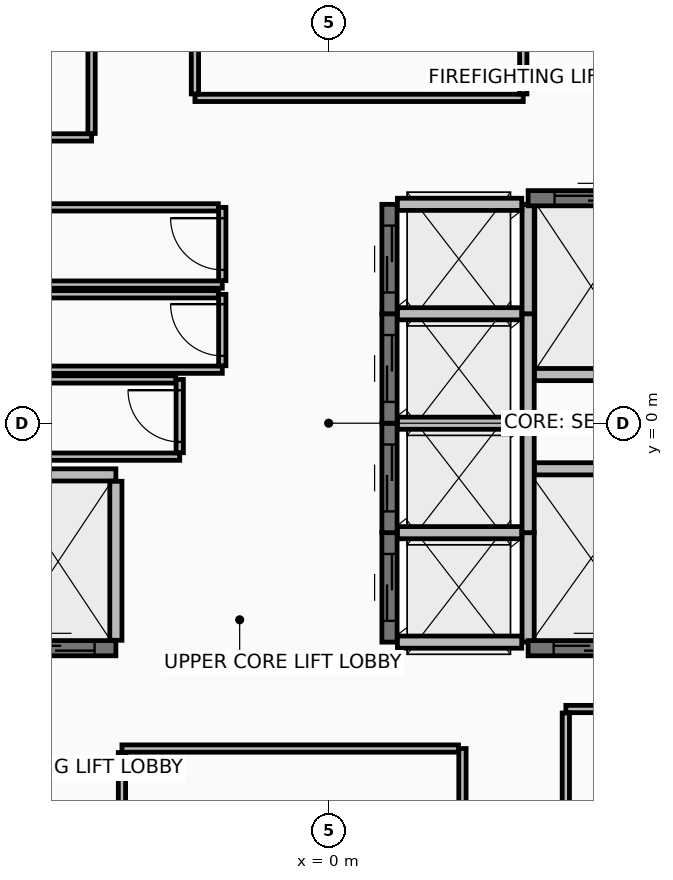
"""IFC4 building model, lengths in metres.
Left out: names, types, materials, properties, quantities, classifications, styles, units other than length and angle.
Written with IfcOpenShell. Run it as: python <this file> out.ifc"""

import sys

from ifc_helpers import new_model, si_unit, direction, frame, frame_2d, origin, place, context, subcontext, project, spatial, rectangle, extrude, element, fill, save


model = new_model("IFC4")
c1 = context("Model", 3, precision=1e-05, world=origin(), true_north=direction((0.0, 1.0)))
c2 = subcontext(c1, "Body", "Model", "MODEL_VIEW")
j1 = project(units=[si_unit("LENGTHUNIT", "METRE"), si_unit("PLANEANGLEUNIT", "RADIAN")], contexts=[c1])
p1 = place(None, origin())
s1 = spatial("IfcSite", under=j1, at=p1, CompositionType="ELEMENT")
p2 = place(p1, origin())
s2 = spatial("IfcBuilding", under=s1, at=p2, CompositionType="ELEMENT")
p3 = place(p2, frame((0.0, 0.0, 298.0)))
s3 = spatial("IfcBuildingStorey", under=s2, at=p3, CompositionType="ELEMENT", Elevation=298.0)
p4 = place(p3, frame((1.0, -3.6, 0.0), z_axis=(0.0, 0.0, 1.0), x_axis=(0.0, 1.0, 0.0)))
e1 = element("IfcWall", 1, at=p4, inside=s3, PredefinedType="SHEAR", context=c2, shape_type="SweptSolid", body=[
    extrude(rectangle(XDim=1.8, YDim=0.25, at=frame_2d((0.9, 0.0))), origin(), (0.0, 0.0, 1.0), 3.95),
])
p5 = place(p4, frame((0.35, 0.0, 0.0)))
e2 = element("IfcOpeningElement", 2, at=p5, cuts=e1, PredefinedType="OPENING", context=c2, shape_type="SweptSolid", body=[
    extrude(rectangle(XDim=1.1, YDim=2.2, at=frame_2d((0.55, 1.1))), frame((0.0, 0.135, 0.0), z_axis=(0.0, -1.0, 0.0), x_axis=(1.0, 0.0, 0.0)), (0.0, 0.0, 1.0), 0.27),
])
p6 = place(p3, frame((3.28, -3.6, 0.0), z_axis=(0.0, 0.0, 1.0), x_axis=(0.0, 1.0, 0.0)))
e3 = element("IfcWall", 3, at=p6, inside=s3, PredefinedType="PARTITIONING", context=c2, shape_type="SweptSolid", body=[
    extrude(rectangle(XDim=1.8, YDim=0.2, at=frame_2d((0.9, 0.0))), origin(), (0.0, 0.0, 1.0), 3.95),
])
for number, where, z_axis, x_axis in (
    (4, (1.13, -3.6, 0.0), (0.0, 0.0, 1.0), (1.0, 0.0, 0.0)),
    (5, (1.13, -1.8, 0.0), (0.0, 0.0, 1.0), (1.0, 0.0, 0.0)),
):
    element("IfcWall", number, at=place(p3, frame(where, z_axis=z_axis, x_axis=x_axis)), inside=s3, PredefinedType="PARTITIONING", context=c2, shape_type="SweptSolid", body=[
        extrude(rectangle(XDim=2.045, YDim=0.2, at=frame_2d((1.022, 0.0))), origin(), (0.0, 0.0, 1.0), 3.95),
    ])
p7 = place(p3, frame((1.0, -1.8, 0.0), z_axis=(0.0, 0.0, 1.0), x_axis=(0.0, 1.0, 0.0)))
e6 = element("IfcWall", 6, at=p7, inside=s3, PredefinedType="SHEAR", context=c2, shape_type="SweptSolid", body=[
    extrude(rectangle(XDim=1.8, YDim=0.25, at=frame_2d((0.9, 0.0))), origin(), (0.0, 0.0, 1.0), 3.95),
])
p8 = place(p7, frame((0.35, 0.0, 0.0)))
e7 = element("IfcOpeningElement", 7, at=p8, cuts=e6, PredefinedType="OPENING", context=c2, shape_type="SweptSolid", body=[
    extrude(rectangle(XDim=1.1, YDim=2.2, at=frame_2d((0.55, 1.1))), frame((0.0, 0.135, 0.0), z_axis=(0.0, -1.0, 0.0), x_axis=(1.0, 0.0, 0.0)), (0.0, 0.0, 1.0), 0.27),
])
p9 = place(p3, frame((3.28, -1.8, 0.0), z_axis=(0.0, 0.0, 1.0), x_axis=(0.0, 1.0, 0.0)))
e8 = element("IfcWall", 8, at=p9, inside=s3, PredefinedType="PARTITIONING", context=c2, shape_type="SweptSolid", body=[
    extrude(rectangle(XDim=1.8, YDim=0.2, at=frame_2d((0.9, 0.0))), origin(), (0.0, 0.0, 1.0), 3.95),
])
p10 = place(p3, frame((1.13, 0.0, 0.0), z_axis=(0.0, 0.0, 1.0), x_axis=(1.0, 0.0, 0.0)))
e9 = element("IfcWall", 9, at=p10, inside=s3, PredefinedType="PARTITIONING", context=c2, shape_type="SweptSolid", body=[
    extrude(rectangle(XDim=2.045, YDim=0.2, at=frame_2d((1.022, 0.0))), origin(), (0.0, 0.0, 1.0), 3.95),
])
p11 = place(p3, frame((1.0, 0.0, 0.0), z_axis=(0.0, 0.0, 1.0), x_axis=(0.0, 1.0, 0.0)))
e10 = element("IfcWall", 10, at=p11, inside=s3, PredefinedType="SHEAR", context=c2, shape_type="SweptSolid", body=[
    extrude(rectangle(XDim=1.8, YDim=0.25, at=frame_2d((0.9, 0.0))), origin(), (0.0, 0.0, 1.0), 3.95),
])
p12 = place(p11, frame((0.35, 0.0, 0.0)))
e11 = element("IfcOpeningElement", 11, at=p12, cuts=e10, PredefinedType="OPENING", context=c2, shape_type="SweptSolid", body=[
    extrude(rectangle(XDim=1.1, YDim=2.2, at=frame_2d((0.55, 1.1))), frame((0.0, 0.135, 0.0), z_axis=(0.0, -1.0, 0.0), x_axis=(1.0, 0.0, 0.0)), (0.0, 0.0, 1.0), 0.27),
])
p13 = place(p3, frame((3.28, 0.0, 0.0), z_axis=(0.0, 0.0, 1.0), x_axis=(0.0, 1.0, 0.0)))
e12 = element("IfcWall", 12, at=p13, inside=s3, PredefinedType="PARTITIONING", context=c2, shape_type="SweptSolid", body=[
    extrude(rectangle(XDim=1.8, YDim=0.2, at=frame_2d((0.9, 0.0))), origin(), (0.0, 0.0, 1.0), 3.95),
])
p14 = place(p3, frame((1.13, 1.8, 0.0), z_axis=(0.0, 0.0, 1.0), x_axis=(1.0, 0.0, 0.0)))
e13 = element("IfcWall", 13, at=p14, inside=s3, PredefinedType="PARTITIONING", context=c2, shape_type="SweptSolid", body=[
    extrude(rectangle(XDim=2.045, YDim=0.2, at=frame_2d((1.022, 0.0))), origin(), (0.0, 0.0, 1.0), 3.95),
])
p15 = place(p3, frame((1.0, 1.8, 0.0), z_axis=(0.0, 0.0, 1.0), x_axis=(0.0, 1.0, 0.0)))
e14 = element("IfcWall", 14, at=p15, inside=s3, PredefinedType="SHEAR", context=c2, shape_type="SweptSolid", body=[
    extrude(rectangle(XDim=1.8, YDim=0.25, at=frame_2d((0.9, 0.0))), origin(), (0.0, 0.0, 1.0), 3.95),
])
p16 = place(p15, frame((0.35, 0.0, 0.0)))
e15 = element("IfcOpeningElement", 15, at=p16, cuts=e14, PredefinedType="OPENING", context=c2, shape_type="SweptSolid", body=[
    extrude(rectangle(XDim=1.1, YDim=2.2, at=frame_2d((0.55, 1.1))), frame((0.0, 0.135, 0.0), z_axis=(0.0, -1.0, 0.0), x_axis=(1.0, 0.0, 0.0)), (0.0, 0.0, 1.0), 0.27),
])
p17 = place(p3, frame((3.28, 1.8, 0.0), z_axis=(0.0, 0.0, 1.0), x_axis=(0.0, 1.0, 0.0)))
e16 = element("IfcWall", 16, at=p17, inside=s3, PredefinedType="PARTITIONING", context=c2, shape_type="SweptSolid", body=[
    extrude(rectangle(XDim=1.8, YDim=0.2, at=frame_2d((0.9, 0.0))), origin(), (0.0, 0.0, 1.0), 3.95),
])
p18 = place(p3, frame((1.13, 3.6, 0.0), z_axis=(0.0, 0.0, 1.0), x_axis=(1.0, 0.0, 0.0)))
e17 = element("IfcWall", 17, at=p18, inside=s3, PredefinedType="PARTITIONING", context=c2, shape_type="SweptSolid", body=[
    extrude(rectangle(XDim=2.045, YDim=0.2, at=frame_2d((1.022, 0.0))), origin(), (0.0, 0.0, 1.0), 3.245),
])
p19 = place(p3, frame((-5.4, -3.7, 0.0), z_axis=(0.0, 0.0, 1.0), x_axis=(1.0, 0.0, 0.0)))
e18 = element("IfcWall", 18, at=p19, inside=s3, PredefinedType="SHEAR", context=c2, shape_type="SweptSolid", body=[
    extrude(rectangle(XDim=1.9, YDim=0.25, at=frame_2d((0.95, 0.0))), origin(), (0.0, 0.0, 1.0), 3.95),
])
p20 = place(p19, frame((0.35, 0.0, 0.0)))
e19 = element("IfcOpeningElement", 19, at=p20, cuts=e18, PredefinedType="OPENING", context=c2, shape_type="SweptSolid", body=[
    extrude(rectangle(XDim=1.2, YDim=2.2, at=frame_2d((0.6, 1.1))), frame((0.0, 0.135, 0.0), z_axis=(0.0, -1.0, 0.0), x_axis=(1.0, 0.0, 0.0)), (0.0, 0.0, 1.0), 0.27),
])
p21 = place(p3, frame((-5.27, -0.85, 0.0), z_axis=(0.0, 0.0, 1.0), x_axis=(1.0, 0.0, 0.0)))
e20 = element("IfcWall", 20, at=p21, inside=s3, PredefinedType="PARTITIONING", context=c2, shape_type="SweptSolid", body=[
    extrude(rectangle(XDim=1.77, YDim=0.2, at=frame_2d((0.885, 0.0))), origin(), (0.0, 0.0, 1.0), 3.95),
])
p22 = place(p3, frame((-3.5, -3.57, 0.0), z_axis=(0.0, 0.0, 1.0), x_axis=(0.0, 1.0, 0.0)))
e21 = element("IfcWall", 21, at=p22, inside=s3, PredefinedType="PARTITIONING", context=c2, shape_type="SweptSolid", body=[
    extrude(rectangle(XDim=2.615, YDim=0.2, at=frame_2d((1.308, 0.0))), origin(), (0.0, 0.0, 1.0), 3.95),
])
p23 = place(p3, frame((3.28, 3.7, 0.0), z_axis=(0.0, 0.0, 1.0), x_axis=(1.0, 0.0, 0.0)))
e22 = element("IfcWall", 22, at=p23, inside=s3, PredefinedType="SHEAR", context=c2, shape_type="SweptSolid", body=[
    extrude(rectangle(XDim=2.07, YDim=0.25, at=frame_2d((1.035, 0.0))), origin(), (0.0, 0.0, 1.0), 3.95),
])
p24 = place(p23, frame((0.435, 0.0, 0.0)))
e23 = element("IfcOpeningElement", 23, at=p24, cuts=e22, PredefinedType="OPENING", context=c2, shape_type="SweptSolid", body=[
    extrude(rectangle(XDim=1.2, YDim=2.2, at=frame_2d((0.6, 1.1))), frame((0.0, 0.135, 0.0), z_axis=(0.0, -1.0, 0.0), x_axis=(1.0, 0.0, 0.0)), (0.0, 0.0, 1.0), 0.27),
])
p25 = place(p3, frame((3.385, 0.8, 0.0), z_axis=(0.0, 0.0, 1.0), x_axis=(1.0, 0.0, 0.0)))
e24 = element("IfcWall", 24, at=p25, inside=s3, PredefinedType="PARTITIONING", context=c2, shape_type="SweptSolid", body=[
    extrude(rectangle(XDim=1.835, YDim=0.2, at=frame_2d((0.917, 0.0))), origin(), (0.0, 0.0, 1.0), 3.95),
])
p26 = place(p3, frame((3.28, -3.7, 0.0), z_axis=(0.0, 0.0, 1.0), x_axis=(1.0, 0.0, 0.0)))
e25 = element("IfcWall", 25, at=p26, inside=s3, PredefinedType="SHEAR", context=c2, shape_type="SweptSolid", body=[
    extrude(rectangle(XDim=1.94, YDim=0.25, at=frame_2d((0.97, 0.0))), origin(), (0.0, 0.0, 1.0), 3.95),
])
p27 = place(p26, frame((0.42, 0.0, 0.0)))
e26 = element("IfcOpeningElement", 26, at=p27, cuts=e25, PredefinedType="OPENING", context=c2, shape_type="SweptSolid", body=[
    extrude(rectangle(XDim=1.1, YDim=2.2, at=frame_2d((0.55, 1.1))), frame((0.0, 0.135, 0.0), z_axis=(0.0, -1.0, 0.0), x_axis=(1.0, 0.0, 0.0)), (0.0, 0.0, 1.0), 0.27),
])
p28 = place(p3, frame((3.385, -0.75, 0.0), z_axis=(0.0, 0.0, 1.0), x_axis=(1.0, 0.0, 0.0)))
e27 = element("IfcWall", 27, at=p28, inside=s3, PredefinedType="PARTITIONING", context=c2, shape_type="SweptSolid", body=[
    extrude(rectangle(XDim=1.835, YDim=0.2, at=frame_2d((0.917, 0.0))), origin(), (0.0, 0.0, 1.0), 3.95),
])
p29 = place(p3, frame((-5.22, 2.28, 0.0), z_axis=(0.0, 0.0, 1.0), x_axis=(1.0, 0.0, 0.0)))
e28 = element("IfcWall", 28, at=p29, inside=s3, PredefinedType="PARTITIONING", context=c2, shape_type="SweptSolid", body=[
    extrude(rectangle(XDim=3.47, YDim=0.12, at=frame_2d((1.735, 0.0))), origin(), (0.0, 0.0, 1.0), 3.95),
])
p30 = place(p3, frame((-1.75, 2.345, 0.0), z_axis=(0.0, 0.0, 1.0), x_axis=(0.0, 1.0, 0.0)))
e29 = element("IfcWall", 29, at=p30, inside=s3, PredefinedType="PARTITIONING", context=c2, shape_type="SweptSolid", body=[
    extrude(rectangle(XDim=1.205, YDim=0.12, at=frame_2d((0.603, 0.0))), origin(), (0.0, 0.0, 1.0), 3.95),
])
p31 = place(p30, frame((0.177, 0.0, 0.0)))
e30 = element("IfcOpeningElement", 30, at=p31, cuts=e29, PredefinedType="OPENING", context=c2, shape_type="SweptSolid", body=[
    extrude(rectangle(XDim=0.85, YDim=2.1, at=frame_2d((0.425, 1.05))), frame((0.0, 0.07, 0.0), z_axis=(0.0, -1.0, 0.0), x_axis=(1.0, 0.0, 0.0)), (0.0, 0.0, 1.0), 0.14),
])
p32 = place(p3, frame((-1.815, 3.55, 0.0), z_axis=(0.0, 0.0, 1.0), x_axis=(-1.0, 0.0, 0.0)))
e31 = element("IfcWall", 31, at=p32, inside=s3, PredefinedType="PARTITIONING", context=c2, shape_type="SweptSolid", body=[
    extrude(rectangle(XDim=3.405, YDim=0.12, at=frame_2d((1.703, 0.0))), origin(), (0.0, 0.0, 1.0), 3.95),
])
p33 = place(p3, frame((-5.22, 0.88, 0.0), z_axis=(0.0, 0.0, 1.0), x_axis=(1.0, 0.0, 0.0)))
e32 = element("IfcWall", 32, at=p33, inside=s3, PredefinedType="PARTITIONING", context=c2, shape_type="SweptSolid", body=[
    extrude(rectangle(XDim=3.47, YDim=0.12, at=frame_2d((1.735, 0.0))), origin(), (0.0, 0.0, 1.0), 3.95),
])
p34 = place(p3, frame((-1.75, 0.945, 0.0), z_axis=(0.0, 0.0, 1.0), x_axis=(0.0, 1.0, 0.0)))
e33 = element("IfcWall", 33, at=p34, inside=s3, PredefinedType="PARTITIONING", context=c2, shape_type="SweptSolid", body=[
    extrude(rectangle(XDim=1.175, YDim=0.12, at=frame_2d((0.587, 0.0))), origin(), (0.0, 0.0, 1.0), 3.95),
])
p35 = place(p34, frame((0.163, 0.0, 0.0)))
e34 = element("IfcOpeningElement", 34, at=p35, cuts=e33, PredefinedType="OPENING", context=c2, shape_type="SweptSolid", body=[
    extrude(rectangle(XDim=0.85, YDim=2.1, at=frame_2d((0.425, 1.05))), frame((0.0, 0.07, 0.0), z_axis=(0.0, -1.0, 0.0), x_axis=(1.0, 0.0, 0.0)), (0.0, 0.0, 1.0), 0.14),
])
p36 = place(p3, frame((-1.815, 2.12, 0.0), z_axis=(0.0, 0.0, 1.0), x_axis=(-1.0, 0.0, 0.0)))
e35 = element("IfcWall", 35, at=p36, inside=s3, PredefinedType="PARTITIONING", context=c2, shape_type="SweptSolid", body=[
    extrude(rectangle(XDim=3.405, YDim=0.12, at=frame_2d((1.703, 0.0))), origin(), (0.0, 0.0, 1.0), 3.95),
])
p37 = place(p3, frame((-5.22, -0.55, 0.0), z_axis=(0.0, 0.0, 1.0), x_axis=(1.0, 0.0, 0.0)))
e36 = element("IfcWall", 36, at=p37, inside=s3, PredefinedType="PARTITIONING", context=c2, shape_type="SweptSolid", body=[
    extrude(rectangle(XDim=2.77, YDim=0.12, at=frame_2d((1.385, 0.0))), origin(), (0.0, 0.0, 1.0), 3.95),
])
p38 = place(p3, frame((-2.45, -0.485, 0.0), z_axis=(0.0, 0.0, 1.0), x_axis=(0.0, 1.0, 0.0)))
e37 = element("IfcWall", 37, at=p38, inside=s3, PredefinedType="PARTITIONING", context=c2, shape_type="SweptSolid", body=[
    extrude(rectangle(XDim=1.205, YDim=0.12, at=frame_2d((0.603, 0.0))), origin(), (0.0, 0.0, 1.0), 3.95),
])
p39 = place(p38, frame((0.178, 0.0, 0.0)))
e38 = element("IfcOpeningElement", 38, at=p39, cuts=e37, PredefinedType="OPENING", context=c2, shape_type="SweptSolid", body=[
    extrude(rectangle(XDim=0.85, YDim=2.1, at=frame_2d((0.425, 1.05))), frame((0.0, 0.07, 0.0), z_axis=(0.0, -1.0, 0.0), x_axis=(1.0, 0.0, 0.0)), (0.0, 0.0, 1.0), 0.14),
])
p40 = place(p3, frame((-2.515, 0.72, 0.0), z_axis=(0.0, 0.0, 1.0), x_axis=(-1.0, 0.0, 0.0)))
e39 = element("IfcWall", 39, at=p40, inside=s3, PredefinedType="PARTITIONING", context=c2, shape_type="SweptSolid", body=[
    extrude(rectangle(XDim=2.705, YDim=0.12, at=frame_2d((1.353, 0.0))), origin(), (0.0, 0.0, 1.0), 3.95),
])
p41 = place(p3, frame((2.2, -7.42, 0.0), z_axis=(0.0, 0.0, 1.0), x_axis=(0.0, 1.0, 0.0)))
e40 = element("IfcWall", 40, at=p41, inside=s3, PredefinedType="PARTITIONING", context=c2, shape_type="SweptSolid", body=[
    extrude(rectangle(XDim=2.07, YDim=0.12, at=frame_2d((1.035, 0.0))), origin(), (0.0, 0.0, 1.0), 3.245),
])
p42 = place(p3, frame((2.135, -5.35, 0.0), z_axis=(0.0, 0.0, 1.0), x_axis=(-1.0, 0.0, 0.0)))
e41 = element("IfcWall", 41, at=p42, inside=s3, PredefinedType="PARTITIONING", context=c2, shape_type="SweptSolid", body=[
    extrude(rectangle(XDim=5.535, YDim=0.12, at=frame_2d((2.768, 0.0))), origin(), (0.0, 0.0, 1.0), 3.245),
])
p43 = place(p3, frame((-3.4, -5.415, 0.0), z_axis=(0.0, 0.0, 1.0), x_axis=(0.0, -1.0, 0.0)))
e42 = element("IfcWall", 42, at=p43, inside=s3, PredefinedType="PARTITIONING", context=c2, shape_type="SweptSolid", body=[
    extrude(rectangle(XDim=2.8, YDim=0.12, at=frame_2d((1.4, 0.0))), origin(), (0.0, 0.0, 1.0), 3.245),
])
p44 = place(p3, frame((-2.2, 5.35, 0.0), z_axis=(0.0, 0.0, 1.0), x_axis=(1.0, 0.0, 0.0)))
e43 = element("IfcWall", 43, at=p44, inside=s3, PredefinedType="PARTITIONING", context=c2, shape_type="SweptSolid", body=[
    extrude(rectangle(XDim=5.4, YDim=0.12, at=frame_2d((2.7, 0.0))), origin(), (0.0, 0.0, 1.0), 3.245),
])
p45 = place(p3, frame((3.2, 5.415, 0.0), z_axis=(0.0, 0.0, 1.0), x_axis=(0.0, 1.0, 0.0)))
e44 = element("IfcWall", 44, at=p45, inside=s3, PredefinedType="PARTITIONING", context=c2, shape_type="SweptSolid", body=[
    extrude(rectangle(XDim=2.8, YDim=0.12, at=frame_2d((1.4, 0.0))), origin(), (0.0, 0.0, 1.0), 3.245),
])
p46 = place(p3, frame((-2.2, 7.42, 0.0), z_axis=(0.0, 0.0, 1.0), x_axis=(0.0, -1.0, 0.0)))
e45 = element("IfcWall", 45, at=p46, inside=s3, PredefinedType="PARTITIONING", context=c2, shape_type="SweptSolid", body=[
    extrude(rectangle(XDim=2.005, YDim=0.12, at=frame_2d((1.002, 0.0))), origin(), (0.0, 0.0, 1.0), 3.245),
])
p47 = place(p3, frame((-5.35, 4.7, 0.0), z_axis=(0.0, 0.0, 1.0), x_axis=(1.0, 0.0, 0.0)))
e46 = element("IfcWall", 46, at=p47, inside=s3, PredefinedType="PARTITIONING", context=c2, shape_type="SweptSolid", body=[
    extrude(rectangle(XDim=1.45, YDim=0.12, at=frame_2d((0.725, 0.0))), origin(), (0.0, 0.0, 1.0), 3.95),
])
p48 = place(p3, frame((-3.9, 4.765, 0.0), z_axis=(0.0, 0.0, 1.0), x_axis=(0.0, 1.0, 0.0)))
e47 = element("IfcWall", 47, at=p48, inside=s3, PredefinedType="PARTITIONING", context=c2, shape_type="SweptSolid", body=[
    extrude(rectangle(XDim=3.45, YDim=0.12, at=frame_2d((1.725, 0.0))), origin(), (0.0, 0.0, 1.0), 3.245),
])
p49 = place(p3, frame((5.785, -4.7, 0.0), z_axis=(0.0, 0.0, 1.0), x_axis=(-1.0, 0.0, 0.0)))
e48 = element("IfcWall", 48, at=p49, inside=s3, PredefinedType="PARTITIONING", context=c2, shape_type="SweptSolid", body=[
    extrude(rectangle(XDim=1.885, YDim=0.12, at=frame_2d((0.942, 0.0))), origin(), (0.0, 0.0, 1.0), 3.95),
])
p50 = place(p3, frame((3.9, -4.765, 0.0), z_axis=(0.0, 0.0, 1.0), x_axis=(0.0, -1.0, 0.0)))
e49 = element("IfcWall", 49, at=p50, inside=s3, PredefinedType="PARTITIONING", context=c2, shape_type="SweptSolid", body=[
    extrude(rectangle(XDim=3.45, YDim=0.12, at=frame_2d((1.725, 0.0))), origin(), (0.0, 0.0, 1.0), 3.245),
])
p51 = place(p5, origin())
e50 = element("IfcDoor", 50, at=p51, inside=s3, OperationType="SLIDING_TO_LEFT", PredefinedType="DOOR", context=c2, shape_type="SweptSolid", body=[
    extrude(rectangle(XDim=1.1, YDim=2.2, at=frame_2d((0.55, 1.1))), frame((0.0, 0.025, 0.0), z_axis=(0.0, -1.0, 0.0), x_axis=(1.0, 0.0, 0.0)), (0.0, 0.0, 1.0), 0.05),
])
fill(e2, e50)
p52 = place(p8, origin())
e51 = element("IfcDoor", 51, at=p52, inside=s3, OperationType="SLIDING_TO_LEFT", PredefinedType="DOOR", context=c2, shape_type="SweptSolid", body=[
    extrude(rectangle(XDim=1.1, YDim=2.2, at=frame_2d((0.55, 1.1))), frame((0.0, 0.025, 0.0), z_axis=(0.0, -1.0, 0.0), x_axis=(1.0, 0.0, 0.0)), (0.0, 0.0, 1.0), 0.05),
])
fill(e7, e51)
p53 = place(p12, origin())
e52 = element("IfcDoor", 52, at=p53, inside=s3, OperationType="SLIDING_TO_LEFT", PredefinedType="DOOR", context=c2, shape_type="SweptSolid", body=[
    extrude(rectangle(XDim=1.1, YDim=2.2, at=frame_2d((0.55, 1.1))), frame((0.0, 0.025, 0.0), z_axis=(0.0, -1.0, 0.0), x_axis=(1.0, 0.0, 0.0)), (0.0, 0.0, 1.0), 0.05),
])
fill(e11, e52)
p54 = place(p16, origin())
e53 = element("IfcDoor", 53, at=p54, inside=s3, OperationType="SLIDING_TO_LEFT", PredefinedType="DOOR", context=c2, shape_type="SweptSolid", body=[
    extrude(rectangle(XDim=1.1, YDim=2.2, at=frame_2d((0.55, 1.1))), frame((0.0, 0.025, 0.0), z_axis=(0.0, -1.0, 0.0), x_axis=(1.0, 0.0, 0.0)), (0.0, 0.0, 1.0), 0.05),
])
fill(e15, e53)
p55 = place(p20, origin())
e54 = element("IfcDoor", 54, at=p55, inside=s3, OperationType="SLIDING_TO_RIGHT", PredefinedType="DOOR", context=c2, shape_type="SweptSolid", body=[
    extrude(rectangle(XDim=1.2, YDim=2.2, at=frame_2d((0.6, 1.1))), frame((0.0, 0.025, 0.0), z_axis=(0.0, -1.0, 0.0), x_axis=(1.0, 0.0, 0.0)), (0.0, 0.0, 1.0), 0.05),
])
fill(e19, e54)
p56 = place(p24, origin())
e55 = element("IfcDoor", 55, at=p56, inside=s3, OperationType="SLIDING_TO_RIGHT", PredefinedType="DOOR", context=c2, shape_type="SweptSolid", body=[
    extrude(rectangle(XDim=1.2, YDim=2.2, at=frame_2d((0.6, 1.1))), frame((0.0, 0.025, 0.0), z_axis=(0.0, -1.0, 0.0), x_axis=(1.0, 0.0, 0.0)), (0.0, 0.0, 1.0), 0.05),
])
fill(e23, e55)
p57 = place(p27, origin())
e56 = element("IfcDoor", 56, at=p57, inside=s3, OperationType="SLIDING_TO_LEFT", PredefinedType="DOOR", context=c2, shape_type="SweptSolid", body=[
    extrude(rectangle(XDim=1.1, YDim=2.2, at=frame_2d((0.55, 1.1))), frame((0.0, 0.025, 0.0), z_axis=(0.0, -1.0, 0.0), x_axis=(1.0, 0.0, 0.0)), (0.0, 0.0, 1.0), 0.05),
])
fill(e26, e56)
p58 = place(p31, frame((0.85, 0.0, 0.0), z_axis=(0.0, 0.0, 1.0), x_axis=(-1.0, 0.0, 0.0)))
e57 = element("IfcDoor", 57, at=p58, inside=s3, OperationType="SINGLE_SWING_RIGHT", PredefinedType="DOOR", context=c2, shape_type="SweptSolid", body=[
    extrude(rectangle(XDim=0.85, YDim=2.1, at=frame_2d((0.425, 1.05))), frame((0.0, 0.025, 0.0), z_axis=(0.0, -1.0, 0.0), x_axis=(1.0, 0.0, 0.0)), (0.0, 0.0, 1.0), 0.05),
])
fill(e30, e57)
p59 = place(p35, frame((0.85, 0.0, 0.0), z_axis=(0.0, 0.0, 1.0), x_axis=(-1.0, 0.0, 0.0)))
e58 = element("IfcDoor", 58, at=p59, inside=s3, OperationType="SINGLE_SWING_RIGHT", PredefinedType="DOOR", context=c2, shape_type="SweptSolid", body=[
    extrude(rectangle(XDim=0.85, YDim=2.1, at=frame_2d((0.425, 1.05))), frame((0.0, 0.025, 0.0), z_axis=(0.0, -1.0, 0.0), x_axis=(1.0, 0.0, 0.0)), (0.0, 0.0, 1.0), 0.05),
])
fill(e34, e58)
p60 = place(p39, frame((0.85, 0.0, 0.0), z_axis=(0.0, 0.0, 1.0), x_axis=(-1.0, 0.0, 0.0)))
e59 = element("IfcDoor", 59, at=p60, inside=s3, OperationType="SINGLE_SWING_RIGHT", PredefinedType="DOOR", context=c2, shape_type="SweptSolid", body=[
    extrude(rectangle(XDim=0.85, YDim=2.1, at=frame_2d((0.425, 1.05))), frame((0.0, 0.025, 0.0), z_axis=(0.0, -1.0, 0.0), x_axis=(1.0, 0.0, 0.0)), (0.0, 0.0, 1.0), 0.05),
])
fill(e38, e59)
save(model, sys.argv[1])
